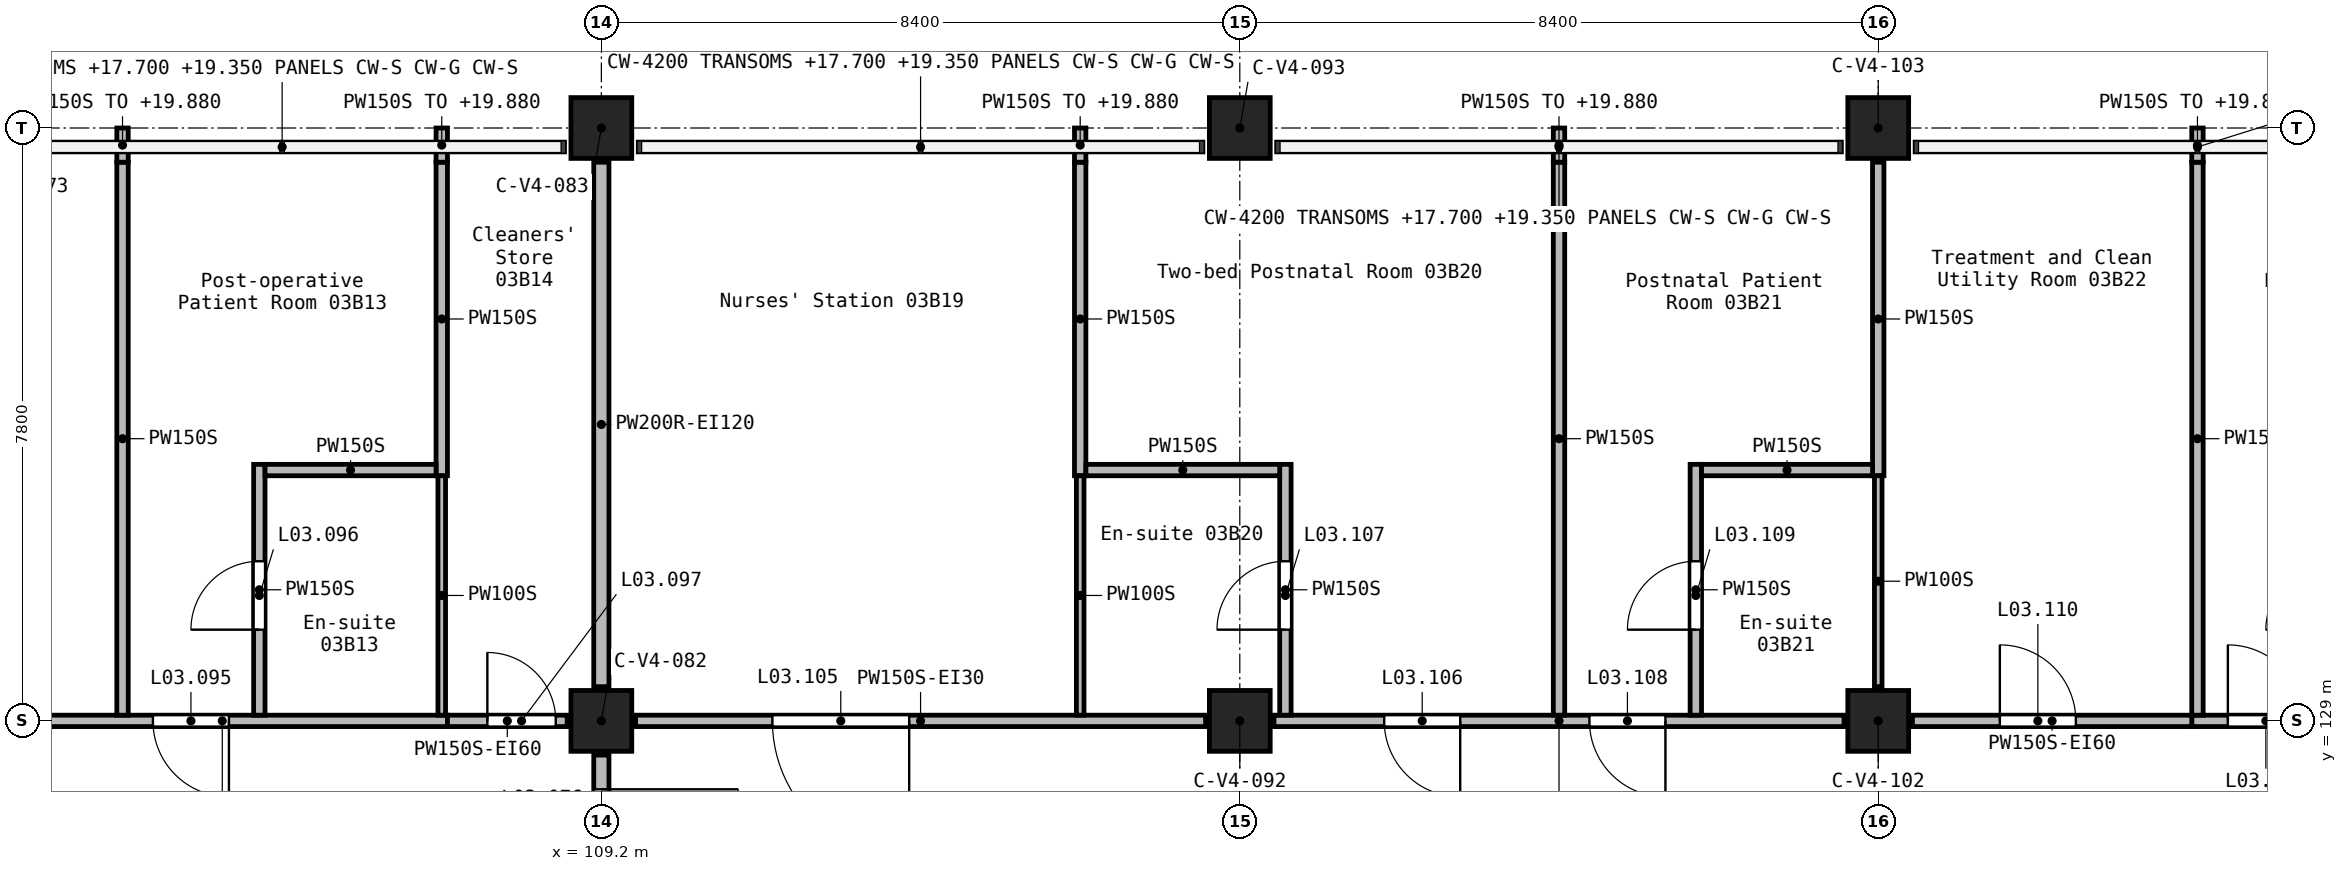
"""IFC4 building model, lengths in metres.
Left out: names, types, materials, properties, quantities, classifications, styles, units other than length and angle.
Written with IfcOpenShell. Run it as: python <this file> out.ifc"""

import sys

from ifc_helpers import new_model, si_unit, direction, frame, frame_2d, origin, origin_2d, place, context, subcontext, project, spatial, rectangle, extrude, element, fill, save


model = new_model("IFC4")
c1 = context("Model", 3, precision=1e-05, world=origin(), true_north=direction((0.0, 1.0)))
c2 = subcontext(c1, "Body", "Model", "MODEL_VIEW")
j1 = project(units=[si_unit("LENGTHUNIT", "METRE"), si_unit("PLANEANGLEUNIT", "RADIAN")], contexts=[c1])
p1 = place(None, origin())
s1 = spatial("IfcSite", under=j1, at=p1, CompositionType="ELEMENT")
p2 = place(p1, origin())
s2 = spatial("IfcBuilding", under=s1, at=p2, CompositionType="ELEMENT")
p3 = place(p2, frame((0.0, 0.0, 16.8)))
s3 = spatial("IfcBuildingStorey", under=s2, at=p3, CompositionType="ELEMENT", Elevation=16.8)
for number, where, z_axis, x_axis in (
    (1, (109.2, 129.0, 0.0), (0.0, 0.0, 1.0), (1.0, 0.0, 0.0)),
    (2, (109.2, 136.8, 0.0), (0.0, 0.0, 1.0), (1.0, 0.0, 0.0)),
    (3, (117.6, 129.0, 0.0), (0.0, 0.0, 1.0), (1.0, 0.0, 0.0)),
    (4, (117.6, 136.8, 0.0), (0.0, 0.0, 1.0), (1.0, 0.0, 0.0)),
    (5, (126.0, 129.0, 0.0), (0.0, 0.0, 1.0), (1.0, 0.0, 0.0)),
    (6, (126.0, 136.8, 0.0), (0.0, 0.0, 1.0), (1.0, 0.0, 0.0)),
):
    element("IfcColumn", number, at=place(p3, frame(where, z_axis=z_axis, x_axis=x_axis)), inside=s3, PredefinedType="COLUMN", context=c2, shape_type="SweptSolid", body=[
        extrude(rectangle(XDim=0.8, YDim=0.8, at=origin_2d()), origin(), (0.0, 0.0, 1.0), 4.2),
    ])
p4 = place(p3, frame((109.2, 136.35, 0.0), z_axis=(0.0, 0.0, 1.0), x_axis=(0.0, -1.0, 0.0)))
e7 = element("IfcWall", 7, at=p4, inside=s3, PredefinedType="SOLIDWALL", context=c2, shape_type="SweptSolid", body=[
    extrude(rectangle(XDim=6.9, YDim=0.2, at=frame_2d((3.45, 0.0))), origin(), (0.0, 0.0, 1.0), 3.9),
])
p5 = place(p3, frame((109.2, 128.55, 0.0), z_axis=(0.0, 0.0, 1.0), x_axis=(0.0, -1.0, 0.0)))
e8 = element("IfcWall", 8, at=p5, inside=s3, PredefinedType="SOLIDWALL", context=c2, shape_type="SweptSolid", body=[
    extrude(rectangle(XDim=2.7, YDim=0.2, at=frame_2d((1.35, 0.0))), origin(), (0.0, 0.0, 1.0), 3.9),
])
p6 = place(p5, frame((0.45, 0.0, 0.0)))
e9 = element("IfcOpeningElement", 9, at=p6, cuts=e8, PredefinedType="OPENING", context=c2, shape_type="SweptSolid", body=[
    extrude(rectangle(XDim=1.8, YDim=2.1, at=frame_2d((0.9, 1.05))), frame((0.0, 0.11, 0.0), z_axis=(0.0, -1.0, 0.0), x_axis=(1.0, 0.0, 0.0)), (0.0, 0.0, 1.0), 0.22),
])
p7 = place(p3, frame((107.175, 129.0, 0.0), z_axis=(0.0, 0.0, 1.0), x_axis=(-1.0, 0.0, 0.0)))
e10 = element("IfcWall", 10, at=p7, inside=s3, PredefinedType="PARTITIONING", context=c2, shape_type="SweptSolid", body=[
    extrude(rectangle(XDim=5.925, YDim=0.15, at=frame_2d((2.962, 0.0))), origin(), (0.0, 0.0, 1.0), 3.9),
])
p8 = place(p7, frame((2.875, 0.0, 0.0)))
e11 = element("IfcOpeningElement", 11, at=p8, cuts=e10, PredefinedType="OPENING", context=c2, shape_type="SweptSolid", body=[
    extrude(rectangle(XDim=1.0, YDim=2.1, at=frame_2d((0.5, 1.05))), frame((0.0, 0.085, 0.0), z_axis=(0.0, -1.0, 0.0), x_axis=(1.0, 0.0, 0.0)), (0.0, 0.0, 1.0), 0.17),
])
p9 = place(p3, frame((125.55, 129.0, 0.0), z_axis=(0.0, 0.0, 1.0), x_axis=(-1.0, 0.0, 0.0)))
e12 = element("IfcWall", 12, at=p9, inside=s3, PredefinedType="PARTITIONING", context=c2, shape_type="SweptSolid", body=[
    extrude(rectangle(XDim=7.5, YDim=0.15, at=frame_2d((3.75, 0.0))), origin(), (0.0, 0.0, 1.0), 3.9),
])
p10 = place(p9, frame((5.05, 0.0, 0.0)))
e13 = element("IfcOpeningElement", 13, at=p10, cuts=e12, PredefinedType="OPENING", context=c2, shape_type="SweptSolid", body=[
    extrude(rectangle(XDim=1.0, YDim=2.1, at=frame_2d((0.5, 1.05))), frame((0.0, 0.085, 0.0), z_axis=(0.0, -1.0, 0.0), x_axis=(1.0, 0.0, 0.0)), (0.0, 0.0, 1.0), 0.17),
])
p11 = place(p9, frame((2.35, 0.0, 0.0)))
e14 = element("IfcOpeningElement", 14, at=p11, cuts=e12, PredefinedType="OPENING", context=c2, shape_type="SweptSolid", body=[
    extrude(rectangle(XDim=1.0, YDim=2.1, at=frame_2d((0.5, 1.05))), frame((0.0, 0.085, 0.0), z_axis=(0.0, -1.0, 0.0), x_axis=(1.0, 0.0, 0.0)), (0.0, 0.0, 1.0), 0.17),
])
p12 = place(p3, frame((117.15, 129.0, 0.0), z_axis=(0.0, 0.0, 1.0), x_axis=(-1.0, 0.0, 0.0)))
e15 = element("IfcWall", 15, at=p12, inside=s3, PredefinedType="PARTITIONING", context=c2, shape_type="SweptSolid", body=[
    extrude(rectangle(XDim=7.5, YDim=0.15, at=frame_2d((3.75, 0.0))), origin(), (0.0, 0.0, 1.0), 3.9),
])
p13 = place(p12, frame((3.9, 0.0, 0.0)))
e16 = element("IfcOpeningElement", 16, at=p13, cuts=e15, PredefinedType="OPENING", context=c2, shape_type="SweptSolid", body=[
    extrude(rectangle(XDim=1.8, YDim=2.1, at=frame_2d((0.9, 1.05))), frame((0.0, 0.085, 0.0), z_axis=(0.0, -1.0, 0.0), x_axis=(1.0, 0.0, 0.0)), (0.0, 0.0, 1.0), 0.17),
])
p14 = place(p3, frame((130.125, 129.0, 0.0), z_axis=(0.0, 0.0, 1.0), x_axis=(1.0, 0.0, 0.0)))
e17 = element("IfcWall", 17, at=p14, inside=s3, PredefinedType="PARTITIONING", context=c2, shape_type="SweptSolid", body=[
    extrude(rectangle(XDim=3.825, YDim=0.15, at=frame_2d((1.913, 0.0))), origin(), (0.0, 0.0, 1.0), 3.9),
])
p15 = place(p14, frame((0.475, 0.0, 0.0)))
e18 = element("IfcOpeningElement", 18, at=p15, cuts=e17, PredefinedType="OPENING", context=c2, shape_type="SweptSolid", body=[
    extrude(rectangle(XDim=1.0, YDim=2.1, at=frame_2d((0.5, 1.05))), frame((0.0, 0.085, 0.0), z_axis=(0.0, -1.0, 0.0), x_axis=(1.0, 0.0, 0.0)), (0.0, 0.0, 1.0), 0.17),
])
p16 = place(p3, frame((126.45, 129.0, 0.0), z_axis=(0.0, 0.0, 1.0), x_axis=(1.0, 0.0, 0.0)))
e19 = element("IfcWall", 19, at=p16, inside=s3, PredefinedType="PARTITIONING", context=c2, shape_type="SweptSolid", body=[
    extrude(rectangle(XDim=3.675, YDim=0.15, at=frame_2d((1.837, 0.0))), origin(), (0.0, 0.0, 1.0), 3.9),
])
p17 = place(p16, frame((1.15, 0.0, 0.0)))
e20 = element("IfcOpeningElement", 20, at=p17, cuts=e19, PredefinedType="OPENING", context=c2, shape_type="SweptSolid", body=[
    extrude(rectangle(XDim=1.0, YDim=2.1, at=frame_2d((0.5, 1.05))), frame((0.0, 0.085, 0.0), z_axis=(0.0, -1.0, 0.0), x_axis=(1.0, 0.0, 0.0)), (0.0, 0.0, 1.0), 0.17),
])
p18 = place(p3, frame((107.175, 129.0, 0.0), z_axis=(0.0, 0.0, 1.0), x_axis=(1.0, 0.0, 0.0)))
e21 = element("IfcWall", 21, at=p18, inside=s3, PredefinedType="PARTITIONING", context=c2, shape_type="SweptSolid", body=[
    extrude(rectangle(XDim=1.575, YDim=0.15, at=frame_2d((0.788, 0.0))), origin(), (0.0, 0.0, 1.0), 3.9),
])
p19 = place(p18, frame((0.525, 0.0, 0.0)))
e22 = element("IfcOpeningElement", 22, at=p19, cuts=e21, PredefinedType="OPENING", context=c2, shape_type="SweptSolid", body=[
    extrude(rectangle(XDim=0.9, YDim=2.1, at=frame_2d((0.45, 1.05))), frame((0.0, 0.085, 0.0), z_axis=(0.0, -1.0, 0.0), x_axis=(1.0, 0.0, 0.0)), (0.0, 0.0, 1.0), 0.17),
])
p20 = place(p3, frame((102.9, 129.075, 0.0), z_axis=(0.0, 0.0, 1.0), x_axis=(0.0, 1.0, 0.0)))
e23 = element("IfcWall", 23, at=p20, inside=s3, PredefinedType="PARTITIONING", context=c2, shape_type="SweptSolid", body=[
    extrude(rectangle(XDim=7.275, YDim=0.15, at=frame_2d((3.638, 0.0))), origin(), (0.0, 0.0, 1.0), 3.9),
])
p21 = place(p3, frame((102.9, 136.35, 0.0), z_axis=(0.0, 0.0, 1.0), x_axis=(0.0, 1.0, 0.0)))
e24 = element("IfcWall", 24, at=p21, inside=s3, PredefinedType="PARTITIONING", context=c2, shape_type="SweptSolid", body=[
    extrude(rectangle(XDim=0.45, YDim=0.15, at=frame_2d((0.225, 0.0))), origin(), (0.0, 0.0, 1.0), 3.08),
])
p22 = place(p3, frame((121.8, 129.075, 0.0), z_axis=(0.0, 0.0, 1.0), x_axis=(0.0, 1.0, 0.0)))
e25 = element("IfcWall", 25, at=p22, inside=s3, PredefinedType="PARTITIONING", context=c2, shape_type="SweptSolid", body=[
    extrude(rectangle(XDim=7.275, YDim=0.15, at=frame_2d((3.638, 0.0))), origin(), (0.0, 0.0, 1.0), 3.9),
])
p23 = place(p3, frame((121.8, 136.35, 0.0), z_axis=(0.0, 0.0, 1.0), x_axis=(0.0, 1.0, 0.0)))
e26 = element("IfcWall", 26, at=p23, inside=s3, PredefinedType="PARTITIONING", context=c2, shape_type="SweptSolid", body=[
    extrude(rectangle(XDim=0.45, YDim=0.15, at=frame_2d((0.225, 0.0))), origin(), (0.0, 0.0, 1.0), 3.08),
])
p24 = place(p3, frame((130.2, 129.075, 0.0), z_axis=(0.0, 0.0, 1.0), x_axis=(0.0, 1.0, 0.0)))
e27 = element("IfcWall", 27, at=p24, inside=s3, PredefinedType="PARTITIONING", context=c2, shape_type="SweptSolid", body=[
    extrude(rectangle(XDim=7.275, YDim=0.15, at=frame_2d((3.638, 0.0))), origin(), (0.0, 0.0, 1.0), 3.9),
])
p25 = place(p3, frame((130.2, 136.35, 0.0), z_axis=(0.0, 0.0, 1.0), x_axis=(0.0, 1.0, 0.0)))
e28 = element("IfcWall", 28, at=p25, inside=s3, PredefinedType="PARTITIONING", context=c2, shape_type="SweptSolid", body=[
    extrude(rectangle(XDim=0.45, YDim=0.15, at=frame_2d((0.225, 0.0))), origin(), (0.0, 0.0, 1.0), 3.08),
])
p26 = place(p3, frame((107.1, 132.225, 0.0), z_axis=(0.0, 0.0, 1.0), x_axis=(0.0, 1.0, 0.0)))
e29 = element("IfcWall", 29, at=p26, inside=s3, PredefinedType="PARTITIONING", context=c2, shape_type="SweptSolid", body=[
    extrude(rectangle(XDim=4.125, YDim=0.15, at=frame_2d((2.062, 0.0))), origin(), (0.0, 0.0, 1.0), 3.9),
])
p27 = place(p3, frame((107.1, 136.35, 0.0), z_axis=(0.0, 0.0, 1.0), x_axis=(0.0, 1.0, 0.0)))
e30 = element("IfcWall", 30, at=p27, inside=s3, PredefinedType="PARTITIONING", context=c2, shape_type="SweptSolid", body=[
    extrude(rectangle(XDim=0.45, YDim=0.15, at=frame_2d((0.225, 0.0))), origin(), (0.0, 0.0, 1.0), 3.08),
])
p28 = place(p3, frame((115.5, 132.225, 0.0), z_axis=(0.0, 0.0, 1.0), x_axis=(0.0, 1.0, 0.0)))
e31 = element("IfcWall", 31, at=p28, inside=s3, PredefinedType="PARTITIONING", context=c2, shape_type="SweptSolid", body=[
    extrude(rectangle(XDim=4.125, YDim=0.15, at=frame_2d((2.062, 0.0))), origin(), (0.0, 0.0, 1.0), 3.9),
])
p29 = place(p3, frame((115.5, 136.35, 0.0), z_axis=(0.0, 0.0, 1.0), x_axis=(0.0, 1.0, 0.0)))
e32 = element("IfcWall", 32, at=p29, inside=s3, PredefinedType="PARTITIONING", context=c2, shape_type="SweptSolid", body=[
    extrude(rectangle(XDim=0.45, YDim=0.15, at=frame_2d((0.225, 0.0))), origin(), (0.0, 0.0, 1.0), 3.08),
])
p30 = place(p3, frame((126.0, 132.225, 0.0), z_axis=(0.0, 0.0, 1.0), x_axis=(0.0, 1.0, 0.0)))
e33 = element("IfcWall", 33, at=p30, inside=s3, PredefinedType="PARTITIONING", context=c2, shape_type="SweptSolid", body=[
    extrude(rectangle(XDim=4.125, YDim=0.15, at=frame_2d((2.062, 0.0))), origin(), (0.0, 0.0, 1.0), 3.9),
])
p31 = place(p3, frame((104.7, 129.075, 0.0), z_axis=(0.0, 0.0, 1.0), x_axis=(0.0, 1.0, 0.0)))
e34 = element("IfcWall", 34, at=p31, inside=s3, PredefinedType="PARTITIONING", context=c2, shape_type="SweptSolid", body=[
    extrude(rectangle(XDim=3.3, YDim=0.15, at=frame_2d((1.65, 0.0))), origin(), (0.0, 0.0, 1.0), 3.9),
])
p32 = place(p31, frame((1.125, 0.0, 0.0)))
e35 = element("IfcOpeningElement", 35, at=p32, cuts=e34, PredefinedType="OPENING", context=c2, shape_type="SweptSolid", body=[
    extrude(rectangle(XDim=0.9, YDim=2.1, at=frame_2d((0.45, 1.05))), frame((0.0, 0.085, 0.0), z_axis=(0.0, -1.0, 0.0), x_axis=(1.0, 0.0, 0.0)), (0.0, 0.0, 1.0), 0.17),
])
p33 = place(p3, frame((118.2, 129.075, 0.0), z_axis=(0.0, 0.0, 1.0), x_axis=(0.0, 1.0, 0.0)))
e36 = element("IfcWall", 36, at=p33, inside=s3, PredefinedType="PARTITIONING", context=c2, shape_type="SweptSolid", body=[
    extrude(rectangle(XDim=3.3, YDim=0.15, at=frame_2d((1.65, 0.0))), origin(), (0.0, 0.0, 1.0), 3.9),
])
p34 = place(p33, frame((1.125, 0.0, 0.0)))
e37 = element("IfcOpeningElement", 37, at=p34, cuts=e36, PredefinedType="OPENING", context=c2, shape_type="SweptSolid", body=[
    extrude(rectangle(XDim=0.9, YDim=2.1, at=frame_2d((0.45, 1.05))), frame((0.0, 0.085, 0.0), z_axis=(0.0, -1.0, 0.0), x_axis=(1.0, 0.0, 0.0)), (0.0, 0.0, 1.0), 0.17),
])
p35 = place(p3, frame((123.6, 129.075, 0.0), z_axis=(0.0, 0.0, 1.0), x_axis=(0.0, 1.0, 0.0)))
e38 = element("IfcWall", 38, at=p35, inside=s3, PredefinedType="PARTITIONING", context=c2, shape_type="SweptSolid", body=[
    extrude(rectangle(XDim=3.3, YDim=0.15, at=frame_2d((1.65, 0.0))), origin(), (0.0, 0.0, 1.0), 3.9),
])
p36 = place(p35, frame((1.125, 0.0, 0.0)))
e39 = element("IfcOpeningElement", 39, at=p36, cuts=e38, PredefinedType="OPENING", context=c2, shape_type="SweptSolid", body=[
    extrude(rectangle(XDim=0.9, YDim=2.1, at=frame_2d((0.45, 1.05))), frame((0.0, 0.085, 0.0), z_axis=(0.0, -1.0, 0.0), x_axis=(1.0, 0.0, 0.0)), (0.0, 0.0, 1.0), 0.17),
])
p37 = place(p3, frame((115.575, 132.3, 0.0), z_axis=(0.0, 0.0, 1.0), x_axis=(1.0, 0.0, 0.0)))
e40 = element("IfcWall", 40, at=p37, inside=s3, PredefinedType="PARTITIONING", context=c2, shape_type="SweptSolid", body=[
    extrude(rectangle(XDim=2.55, YDim=0.15, at=frame_2d((1.275, 0.0))), origin(), (0.0, 0.0, 1.0), 3.9),
])
for number, where, z_axis, x_axis in (
    (41, (123.675, 132.3, 0.0), (0.0, 0.0, 1.0), (1.0, 0.0, 0.0)),
    (42, (104.775, 132.3, 0.0), (0.0, 0.0, 1.0), (1.0, 0.0, 0.0)),
):
    element("IfcWall", number, at=place(p3, frame(where, z_axis=z_axis, x_axis=x_axis)), inside=s3, PredefinedType="PARTITIONING", context=c2, shape_type="SweptSolid", body=[
        extrude(rectangle(XDim=2.25, YDim=0.15, at=frame_2d((1.125, 0.0))), origin(), (0.0, 0.0, 1.0), 3.9),
    ])
for number, where, z_axis, x_axis in (
    (43, (107.1, 129.075, 0.0), (0.0, 0.0, 1.0), (0.0, 1.0, 0.0)),
    (44, (115.5, 129.075, 0.0), (0.0, 0.0, 1.0), (0.0, 1.0, 0.0)),
):
    element("IfcWall", number, at=place(p3, frame(where, z_axis=z_axis, x_axis=x_axis)), inside=s3, PredefinedType="PARTITIONING", context=c2, shape_type="SweptSolid", body=[
        extrude(rectangle(XDim=3.15, YDim=0.1, at=frame_2d((1.575, 0.0))), origin(), (0.0, 0.0, 1.0), 3.9),
    ])
p38 = place(p3, frame((126.0, 129.45, 0.0), z_axis=(0.0, 0.0, 1.0), x_axis=(0.0, 1.0, 0.0)))
e45 = element("IfcWall", 45, at=p38, inside=s3, PredefinedType="PARTITIONING", context=c2, shape_type="SweptSolid", body=[
    extrude(rectangle(XDim=2.775, YDim=0.1, at=frame_2d((1.388, 0.0))), origin(), (0.0, 0.0, 1.0), 3.9),
])
p39 = place(p6, origin())
e46 = element("IfcDoor", 46, at=p39, inside=s3, OperationType="DOUBLE_DOOR_SINGLE_SWING", PredefinedType="DOOR", context=c2, shape_type="SweptSolid", body=[
    extrude(rectangle(XDim=1.8, YDim=2.1, at=frame_2d((0.9, 1.05))), frame((0.0, 0.025, 0.0), z_axis=(0.0, -1.0, 0.0), x_axis=(1.0, 0.0, 0.0)), (0.0, 0.0, 1.0), 0.05),
])
fill(e9, e46)
p40 = place(p8, frame((1.0, 0.0, 0.0), z_axis=(0.0, 0.0, 1.0), x_axis=(-1.0, 0.0, 0.0)))
e47 = element("IfcDoor", 47, at=p40, inside=s3, OperationType="SINGLE_SWING_LEFT", PredefinedType="DOOR", context=c2, shape_type="SweptSolid", body=[
    extrude(rectangle(XDim=1.0, YDim=2.1, at=frame_2d((0.5, 1.05))), frame((0.0, 0.025, 0.0), z_axis=(0.0, -1.0, 0.0), x_axis=(1.0, 0.0, 0.0)), (0.0, 0.0, 1.0), 0.05),
])
fill(e11, e47)
p41 = place(p32, frame((0.9, 0.0, 0.0), z_axis=(0.0, 0.0, 1.0), x_axis=(-1.0, 0.0, 0.0)))
e48 = element("IfcDoor", 48, at=p41, inside=s3, OperationType="SINGLE_SWING_RIGHT", PredefinedType="DOOR", context=c2, shape_type="SweptSolid", body=[
    extrude(rectangle(XDim=0.9, YDim=2.1, at=frame_2d((0.45, 1.05))), frame((0.0, 0.025, 0.0), z_axis=(0.0, -1.0, 0.0), x_axis=(1.0, 0.0, 0.0)), (0.0, 0.0, 1.0), 0.05),
])
fill(e35, e48)
p42 = place(p19, origin())
e49 = element("IfcDoor", 49, at=p42, inside=s3, OperationType="SINGLE_SWING_RIGHT", PredefinedType="DOOR", context=c2, shape_type="SweptSolid", body=[
    extrude(rectangle(XDim=0.9, YDim=2.1, at=frame_2d((0.45, 1.05))), frame((0.0, 0.025, 0.0), z_axis=(0.0, -1.0, 0.0), x_axis=(1.0, 0.0, 0.0)), (0.0, 0.0, 1.0), 0.05),
])
fill(e22, e49)
p43 = place(p13, frame((1.8, 0.0, 0.0), z_axis=(0.0, 0.0, 1.0), x_axis=(-1.0, 0.0, 0.0)))
e50 = element("IfcDoor", 50, at=p43, inside=s3, OperationType="DOUBLE_DOOR_SINGLE_SWING", PredefinedType="DOOR", context=c2, shape_type="SweptSolid", body=[
    extrude(rectangle(XDim=1.8, YDim=2.1, at=frame_2d((0.9, 1.05))), frame((0.0, 0.025, 0.0), z_axis=(0.0, -1.0, 0.0), x_axis=(1.0, 0.0, 0.0)), (0.0, 0.0, 1.0), 0.05),
])
fill(e16, e50)
p44 = place(p10, frame((1.0, 0.0, 0.0), z_axis=(0.0, 0.0, 1.0), x_axis=(-1.0, 0.0, 0.0)))
e51 = element("IfcDoor", 51, at=p44, inside=s3, OperationType="SINGLE_SWING_LEFT", PredefinedType="DOOR", context=c2, shape_type="SweptSolid", body=[
    extrude(rectangle(XDim=1.0, YDim=2.1, at=frame_2d((0.5, 1.05))), frame((0.0, 0.025, 0.0), z_axis=(0.0, -1.0, 0.0), x_axis=(1.0, 0.0, 0.0)), (0.0, 0.0, 1.0), 0.05),
])
fill(e13, e51)
p45 = place(p34, origin())
e52 = element("IfcDoor", 52, at=p45, inside=s3, OperationType="SINGLE_SWING_LEFT", PredefinedType="DOOR", context=c2, shape_type="SweptSolid", body=[
    extrude(rectangle(XDim=0.9, YDim=2.1, at=frame_2d((0.45, 1.05))), frame((0.0, 0.025, 0.0), z_axis=(0.0, -1.0, 0.0), x_axis=(1.0, 0.0, 0.0)), (0.0, 0.0, 1.0), 0.05),
])
fill(e37, e52)
p46 = place(p11, frame((1.0, 0.0, 0.0), z_axis=(0.0, 0.0, 1.0), x_axis=(-1.0, 0.0, 0.0)))
e53 = element("IfcDoor", 53, at=p46, inside=s3, OperationType="SINGLE_SWING_RIGHT", PredefinedType="DOOR", context=c2, shape_type="SweptSolid", body=[
    extrude(rectangle(XDim=1.0, YDim=2.1, at=frame_2d((0.5, 1.05))), frame((0.0, 0.025, 0.0), z_axis=(0.0, -1.0, 0.0), x_axis=(1.0, 0.0, 0.0)), (0.0, 0.0, 1.0), 0.05),
])
fill(e14, e53)
p47 = place(p36, frame((0.9, 0.0, 0.0), z_axis=(0.0, 0.0, 1.0), x_axis=(-1.0, 0.0, 0.0)))
e54 = element("IfcDoor", 54, at=p47, inside=s3, OperationType="SINGLE_SWING_RIGHT", PredefinedType="DOOR", context=c2, shape_type="SweptSolid", body=[
    extrude(rectangle(XDim=0.9, YDim=2.1, at=frame_2d((0.45, 1.05))), frame((0.0, 0.025, 0.0), z_axis=(0.0, -1.0, 0.0), x_axis=(1.0, 0.0, 0.0)), (0.0, 0.0, 1.0), 0.05),
])
fill(e39, e54)
p48 = place(p17, origin())
e55 = element("IfcDoor", 55, at=p48, inside=s3, OperationType="SINGLE_SWING_LEFT", PredefinedType="DOOR", context=c2, shape_type="SweptSolid", body=[
    extrude(rectangle(XDim=1.0, YDim=2.1, at=frame_2d((0.5, 1.05))), frame((0.0, 0.025, 0.0), z_axis=(0.0, -1.0, 0.0), x_axis=(1.0, 0.0, 0.0)), (0.0, 0.0, 1.0), 0.05),
])
fill(e20, e55)
p49 = place(p15, origin())
e56 = element("IfcDoor", 56, at=p49, inside=s3, OperationType="SINGLE_SWING_LEFT", PredefinedType="DOOR", context=c2, shape_type="SweptSolid", body=[
    extrude(rectangle(XDim=1.0, YDim=2.1, at=frame_2d((0.5, 1.05))), frame((0.0, 0.025, 0.0), z_axis=(0.0, -1.0, 0.0), x_axis=(1.0, 0.0, 0.0)), (0.0, 0.0, 1.0), 0.05),
])
fill(e18, e56)
save(model, sys.argv[1])
